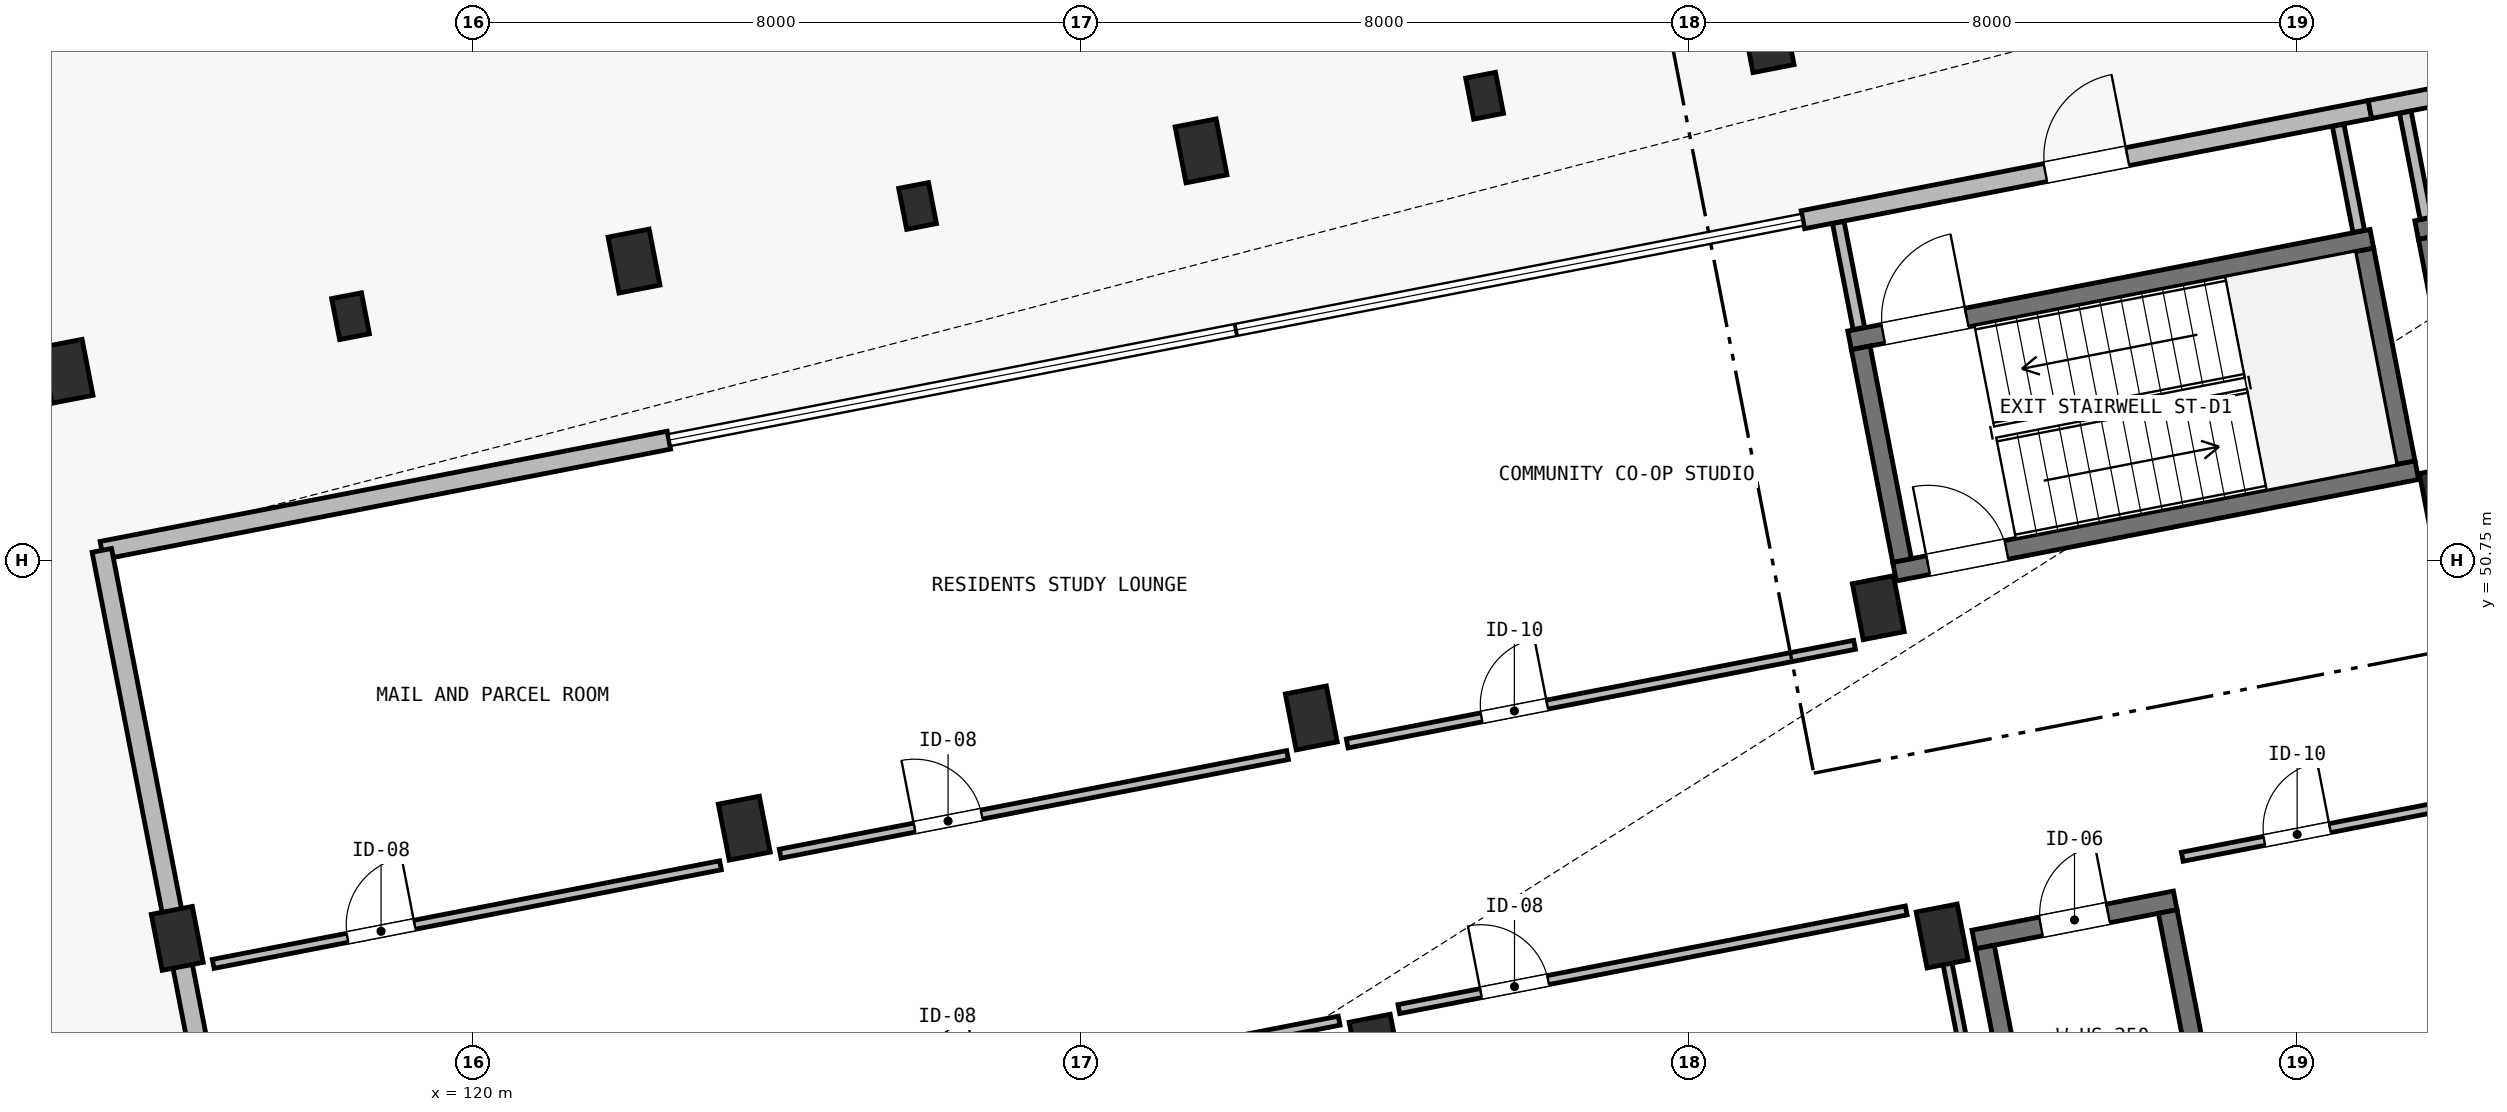
"""IFC4 building model, lengths in metres.
Left out: names, types, materials, properties, quantities, classifications, styles, units other than length and angle.
Written with IfcOpenShell. Run it as: python <this file> out.ifc"""

import sys

from ifc_helpers import new_model, si_unit, direction, frame, frame_2d, origin, origin_2d, place, context, subcontext, project, spatial, rectangle, extrude, element, fill, save


model = new_model("IFC4")
c1 = context("Model", 3, precision=1e-05, world=origin(), true_north=direction((0.0, 1.0)))
c2 = subcontext(c1, "Body", "Model", "MODEL_VIEW")
j1 = project(units=[si_unit("LENGTHUNIT", "METRE"), si_unit("PLANEANGLEUNIT", "RADIAN")], contexts=[c1])
p1 = place(None, origin())
s1 = spatial("IfcSite", under=j1, at=p1, CompositionType="ELEMENT")
p2 = place(p1, origin())
s2 = spatial("IfcBuilding", under=s1, at=p2, CompositionType="ELEMENT")
p3 = place(p2, origin())
s3 = spatial("IfcBuildingStorey", under=s2, at=p3, CompositionType="ELEMENT", Elevation=0.0)
for number, where, z_axis, x_axis in (
    (1, (116.11, 45.78, -0.35), (0.0, 0.0, 1.0), (0.982, 0.191, 0.0)),
    (2, (114.66, 53.24, -0.35), (0.0, 0.0, 1.0), (0.982, 0.191, 0.0)),
    (3, (123.571, 47.23, -0.35), (0.0, 0.0, 1.0), (0.982, 0.191, 0.0)),
    (4, (122.121, 54.69, -0.35), (0.0, 0.0, 1.0), (0.982, 0.191, 0.0)),
    (5, (131.871, 44.361, -0.35), (0.0, 0.0, 1.0), (0.982, 0.191, 0.0)),
    (6, (131.031, 48.68, -0.35), (0.0, 0.0, 1.0), (0.982, 0.191, 0.0)),
    (7, (129.581, 56.14, -0.35), (0.0, 0.0, 1.0), (0.982, 0.191, 0.0)),
    (8, (139.331, 45.811, -0.35), (0.0, 0.0, 1.0), (0.982, 0.191, 0.0)),
    (9, (138.491, 50.13, -0.35), (0.0, 0.0, 1.0), (0.982, 0.191, 0.0)),
    (10, (137.041, 57.59, -0.35), (0.0, 0.0, 1.0), (0.982, 0.191, 0.0)),
    (11, (145.952, 51.58, -0.35), (0.0, 0.0, 1.0), (0.982, 0.191, 0.0)),
):
    element("IfcColumn", number, at=place(p3, frame(where, z_axis=z_axis, x_axis=x_axis)), inside=s3, PredefinedType="COLUMN", context=c2, shape_type="SweptSolid", body=[
        extrude(rectangle(XDim=0.55, YDim=0.75, at=origin_2d()), origin(), (0.0, 0.0, 1.0), 4.85),
    ])
for number, where, z_axis, x_axis in (
    (12, (118.39, 53.965, -0.35), (0.0, 0.0, 1.0), (0.982, 0.191, 0.0)),
    (13, (125.851, 55.415, -0.35), (0.0, 0.0, 1.0), (0.982, 0.191, 0.0)),
    (14, (133.311, 56.865, -0.35), (0.0, 0.0, 1.0), (0.982, 0.191, 0.0)),
):
    element("IfcColumn", number, at=place(p3, frame(where, z_axis=z_axis, x_axis=x_axis)), inside=s3, PredefinedType="PILASTER", context=c2, shape_type="SweptSolid", body=[
        extrude(rectangle(XDim=0.4, YDim=0.55, at=origin_2d()), origin(), (0.0, 0.0, 1.0), 3.7),
    ])
p4 = place(p3, frame((138.113, 53.647, -0.35), z_axis=(0.0, 0.0, 1.0), x_axis=(0.981626097708, 0.19081458094, 0.0)))
e15 = element("IfcWall", 15, at=p4, inside=s3, PredefinedType="SHEAR", context=c2, shape_type="SweptSolid", body=[
    extrude(rectangle(XDim=7.0, YDim=0.25, at=frame_2d((3.5, 0.0))), origin(), (0.0, 0.0, 1.0), 4.85),
])
p5 = place(p4, frame((0.45, 0.0, 0.35)))
e16 = element("IfcOpeningElement", 16, at=p5, cuts=e15, PredefinedType="OPENING", context=c2, shape_type="SweptSolid", body=[
    extrude(rectangle(XDim=1.12, YDim=2.15, at=frame_2d((0.56, 1.075))), frame((0.0, 0.14, 0.0), z_axis=(0.0, -1.0, 0.0), x_axis=(1.0, 0.0, 0.0)), (0.0, 0.0, 1.0), 0.28),
])
p6 = place(p3, frame((138.705, 50.604, -0.35), z_axis=(0.0, 0.0, 1.0), x_axis=(0.981626097708, 0.19081458094, 0.0)))
e17 = element("IfcWall", 17, at=p6, inside=s3, PredefinedType="SHEAR", context=c2, shape_type="SweptSolid", body=[
    extrude(rectangle(XDim=7.0, YDim=0.25, at=frame_2d((3.5, 0.0))), origin(), (0.0, 0.0, 1.0), 4.85),
])
p7 = place(p6, frame((0.45, 0.0, 0.35)))
e18 = element("IfcOpeningElement", 18, at=p7, cuts=e17, PredefinedType="OPENING", context=c2, shape_type="SweptSolid", body=[
    extrude(rectangle(XDim=1.05, YDim=2.15, at=frame_2d((0.525, 1.075))), frame((0.0, 0.14, 0.0), z_axis=(0.0, -1.0, 0.0), x_axis=(1.0, 0.0, 0.0)), (0.0, 0.0, 1.0), 0.28),
])
p8 = place(p3, frame((138.804, 50.751, -0.35), z_axis=(0.0, 0.0, 1.0), x_axis=(-0.190858194834, 0.981617618762, 0.0)))
e19 = element("IfcWall", 19, at=p8, inside=s3, PredefinedType="SHEAR", context=c2, shape_type="SweptSolid", body=[
    extrude(rectangle(XDim=2.85, YDim=0.25, at=frame_2d((1.425, 0.0))), origin(), (0.0, 0.0, 1.0), 4.85),
])
p9 = place(p3, frame((145.43, 52.039, -0.35), z_axis=(0.0, 0.0, 1.0), x_axis=(-0.190842147128, 0.981620738819, 0.0)))
e20 = element("IfcWall", 20, at=p9, inside=s3, PredefinedType="SHEAR", context=c2, shape_type="SweptSolid", body=[
    extrude(rectangle(XDim=2.85, YDim=0.25, at=frame_2d((1.425, 0.0))), origin(), (0.0, 0.0, 1.0), 4.85),
])
p10 = place(p3, frame((145.574, 55.098, -0.35), z_axis=(0.0, 0.0, 1.0), x_axis=(0.981626097708, 0.19081458094, 0.0)))
e21 = element("IfcWall", 21, at=p10, inside=s3, PredefinedType="SHEAR", context=c2, shape_type="SweptSolid", body=[
    extrude(rectangle(XDim=7.0, YDim=0.25, at=frame_2d((3.5, 0.0))), origin(), (0.0, 0.0, 1.0), 4.85),
])
p11 = place(p10, frame((0.45, 0.0, 0.35)))
e22 = element("IfcOpeningElement", 22, at=p11, cuts=e21, PredefinedType="OPENING", context=c2, shape_type="SweptSolid", body=[
    extrude(rectangle(XDim=1.12, YDim=2.15, at=frame_2d((0.56, 1.075))), frame((0.0, 0.14, 0.0), z_axis=(0.0, -1.0, 0.0), x_axis=(1.0, 0.0, 0.0)), (0.0, 0.0, 1.0), 0.28),
])
p12 = place(p3, frame((146.264, 52.201, -0.35), z_axis=(0.0, 0.0, 1.0), x_axis=(-0.190775649797, 0.981633664584, 0.0)))
e23 = element("IfcWall", 23, at=p12, inside=s3, PredefinedType="SHEAR", context=c2, shape_type="SweptSolid", body=[
    extrude(rectangle(XDim=2.85, YDim=0.25, at=frame_2d((1.425, 0.0))), origin(), (0.0, 0.0, 1.0), 4.85),
])
p13 = place(p3, frame((139.748, 45.764, -0.35), z_axis=(0.0, 0.0, 1.0), x_axis=(0.981630445883, 0.190792210834, 0.0)))
e24 = element("IfcWall", 24, at=p13, inside=s3, PredefinedType="SHEAR", context=c2, shape_type="SweptSolid", body=[
    extrude(rectangle(XDim=2.7, YDim=0.25, at=frame_2d((1.35, 0.0))), origin(), (0.0, 0.0, 1.0), 4.85),
])
p14 = place(p13, frame((0.9, 0.0, 0.35)))
e25 = element("IfcOpeningElement", 25, at=p14, cuts=e24, PredefinedType="OPENING", context=c2, shape_type="SweptSolid", body=[
    extrude(rectangle(XDim=0.9, YDim=2.05, at=frame_2d((0.45, 1.025))), frame((0.0, 0.14, 0.0), z_axis=(0.0, -1.0, 0.0), x_axis=(1.0, 0.0, 0.0)), (0.0, 0.0, 1.0), 0.28),
])
for number, where, z_axis, x_axis in (
    (26, (140.218, 43.997, -0.35), (0.0, 0.0, 1.0), (-0.191, 0.982, 0.0)),
    (27, (142.623, 44.464, -0.35), (0.0, 0.0, 1.0), (-0.191, 0.982, 0.0)),
):
    element("IfcWall", number, at=place(p3, frame(where, z_axis=z_axis, x_axis=x_axis)), inside=s3, PredefinedType="SHEAR", context=c2, shape_type="SweptSolid", body=[
        extrude(rectangle(XDim=1.7, YDim=0.25, at=frame_2d((0.85, 0.0))), origin(), (0.0, 0.0, 1.0), 4.85),
    ])
p15 = place(p3, frame((115.118, 50.884, 0.0), z_axis=(0.0, 0.0, 1.0), x_axis=(0.981625252578, 0.19081892857, 0.0)))
e28 = element("IfcWall", 28, at=p15, inside=s3, PredefinedType="SOLIDWALL", context=c2, shape_type="SweptSolid", body=[
    extrude(rectangle(XDim=7.6, YDim=0.24, at=frame_2d((3.8, 0.0))), origin(), (0.0, 0.0, 1.0), 3.35),
])
p16 = place(p3, frame((137.499, 55.234, 0.0), z_axis=(0.0, 0.0, 1.0), x_axis=(0.981625252578, 0.19081892857, 0.0)))
e29 = element("IfcWall", 29, at=p16, inside=s3, PredefinedType="SOLIDWALL", context=c2, shape_type="SweptSolid", body=[
    extrude(rectangle(XDim=7.6, YDim=0.24, at=frame_2d((3.8, 0.0))), origin(), (0.0, 0.0, 1.0), 3.35),
])
p17 = place(p16, frame((3.25, 0.0, 0.0)))
e30 = element("IfcOpeningElement", 30, at=p17, cuts=e29, PredefinedType="OPENING", context=c2, shape_type="SweptSolid", body=[
    extrude(rectangle(XDim=1.1, YDim=2.15, at=frame_2d((0.55, 1.075))), frame((0.0, 0.135, 0.0), z_axis=(0.0, -1.0, 0.0), x_axis=(1.0, 0.0, 0.0)), (0.0, 0.0, 1.0), 0.27),
])
p18 = place(p3, frame((144.959, 56.685, 0.0), z_axis=(0.0, 0.0, 1.0), x_axis=(0.981626422232, 0.190812911449, 0.0)))
e31 = element("IfcWall", 31, at=p18, inside=s3, PredefinedType="SOLIDWALL", context=c2, shape_type="SweptSolid", body=[
    extrude(rectangle(XDim=7.6, YDim=0.24, at=frame_2d((3.8, 0.0))), origin(), (0.0, 0.0, 1.0), 3.35),
])
p19 = place(p18, frame((3.25, 0.0, 0.0)))
e32 = element("IfcOpeningElement", 32, at=p19, cuts=e31, PredefinedType="OPENING", context=c2, shape_type="SweptSolid", body=[
    extrude(rectangle(XDim=1.1, YDim=2.15, at=frame_2d((0.55, 1.075))), frame((0.0, 0.135, 0.0), z_axis=(0.0, -1.0, 0.0), x_axis=(1.0, 0.0, 0.0)), (0.0, 0.0, 1.0), 0.27),
])
p20 = place(p3, frame((117.942, 36.356, 0.0), z_axis=(0.0, 0.0, 1.0), x_axis=(-0.190809169338, 0.981627149633, 0.0)))
e33 = element("IfcWall", 33, at=p20, inside=s3, PredefinedType="SOLIDWALL", context=c2, shape_type="SweptSolid", body=[
    extrude(rectangle(XDim=14.8, YDim=0.26, at=frame_2d((7.4, 0.0))), origin(), (0.0, 0.0, 1.0), 3.35),
])
p21 = place(p3, frame((124.723, 43.399, 0.0), z_axis=(0.0, 0.0, 1.0), x_axis=(0.981630895566, 0.190789897189, 0.0)))
e34 = element("IfcWall", 34, at=p21, inside=s3, PredefinedType="PARTITIONING", context=c2, shape_type="SweptSolid", body=[
    extrude(rectangle(XDim=6.8, YDim=0.12, at=frame_2d((3.4, 0.0))), origin(), (0.0, 0.0, 1.0), 4.22),
])
p22 = place(p21, frame((1.1, 0.0, 0.0)))
e35 = element("IfcOpeningElement", 35, at=p22, cuts=e34, PredefinedType="OPENING", context=c2, shape_type="SweptSolid", body=[
    extrude(rectangle(XDim=0.9, YDim=2.1, at=frame_2d((0.45, 1.05))), frame((0.0, 0.075, 0.0), z_axis=(0.0, -1.0, 0.0), x_axis=(1.0, 0.0, 0.0)), (0.0, 0.0, 1.0), 0.15),
])
p23 = place(p3, frame((132.183, 44.849, 0.0), z_axis=(0.0, 0.0, 1.0), x_axis=(0.981630895566, 0.190789897189, 0.0)))
e36 = element("IfcWall", 36, at=p23, inside=s3, PredefinedType="PARTITIONING", context=c2, shape_type="SweptSolid", body=[
    extrude(rectangle(XDim=6.8, YDim=0.12, at=frame_2d((3.4, 0.0))), origin(), (0.0, 0.0, 1.0), 4.22),
])
p24 = place(p23, frame((1.1, 0.0, 0.0)))
e37 = element("IfcOpeningElement", 37, at=p24, cuts=e36, PredefinedType="OPENING", context=c2, shape_type="SweptSolid", body=[
    extrude(rectangle(XDim=0.9, YDim=2.1, at=frame_2d((0.45, 1.05))), frame((0.0, 0.075, 0.0), z_axis=(0.0, -1.0, 0.0), x_axis=(1.0, 0.0, 0.0)), (0.0, 0.0, 1.0), 0.15),
])
p25 = place(p3, frame((142.49, 46.853, 0.0), z_axis=(0.0, 0.0, 1.0), x_axis=(0.981628093632, 0.190804312824, 0.0)))
e38 = element("IfcWall", 38, at=p25, inside=s3, PredefinedType="PARTITIONING", context=c2, shape_type="SweptSolid", body=[
    extrude(rectangle(XDim=3.9, YDim=0.12, at=frame_2d((1.95, 0.0))), origin(), (0.0, 0.0, 1.0), 4.22),
])
p26 = place(p25, frame((1.1, 0.0, 0.0)))
e39 = element("IfcOpeningElement", 39, at=p26, cuts=e38, PredefinedType="OPENING", context=c2, shape_type="SweptSolid", body=[
    extrude(rectangle(XDim=0.88, YDim=2.1, at=frame_2d((0.44, 1.05))), frame((0.0, 0.075, 0.0), z_axis=(0.0, -1.0, 0.0), x_axis=(1.0, 0.0, 0.0)), (0.0, 0.0, 1.0), 0.15),
])
p27 = place(p3, frame((140.298, 40.834, 0.0), z_axis=(0.0, 0.0, 1.0), x_axis=(-0.190833814627, 0.981622358748, 0.0)))
e40 = element("IfcWall", 40, at=p27, inside=s3, PredefinedType="PARTITIONING", context=c2, shape_type="SweptSolid", body=[
    extrude(rectangle(XDim=4.74, YDim=0.12, at=frame_2d((2.37, 0.0))), origin(), (0.0, 0.0, 1.0), 3.32),
])
p28 = place(p3, frame((116.583, 45.444, 0.0), z_axis=(0.0, 0.0, 1.0), x_axis=(0.981630895566, 0.190789897189, 0.0)))
e41 = element("IfcWall", 41, at=p28, inside=s3, PredefinedType="PARTITIONING", context=c2, shape_type="SweptSolid", body=[
    extrude(rectangle(XDim=6.8, YDim=0.12, at=frame_2d((3.4, 0.0))), origin(), (0.0, 0.0, 1.0), 4.22),
])
p29 = place(p28, frame((1.8, 0.0, 0.0)))
e42 = element("IfcOpeningElement", 42, at=p29, cuts=e41, PredefinedType="OPENING", context=c2, shape_type="SweptSolid", body=[
    extrude(rectangle(XDim=0.9, YDim=2.1, at=frame_2d((0.45, 1.05))), frame((0.0, 0.075, 0.0), z_axis=(0.0, -1.0, 0.0), x_axis=(1.0, 0.0, 0.0)), (0.0, 0.0, 1.0), 0.15),
])
p30 = place(p3, frame((124.043, 46.894, 0.0), z_axis=(0.0, 0.0, 1.0), x_axis=(0.981630895566, 0.190789897189, 0.0)))
e43 = element("IfcWall", 43, at=p30, inside=s3, PredefinedType="PARTITIONING", context=c2, shape_type="SweptSolid", body=[
    extrude(rectangle(XDim=6.8, YDim=0.12, at=frame_2d((3.4, 0.0))), origin(), (0.0, 0.0, 1.0), 4.22),
])
p31 = place(p30, frame((1.8, 0.0, 0.0)))
e44 = element("IfcOpeningElement", 44, at=p31, cuts=e43, PredefinedType="OPENING", context=c2, shape_type="SweptSolid", body=[
    extrude(rectangle(XDim=0.9, YDim=2.1, at=frame_2d((0.45, 1.05))), frame((0.0, 0.075, 0.0), z_axis=(0.0, -1.0, 0.0), x_axis=(1.0, 0.0, 0.0)), (0.0, 0.0, 1.0), 0.15),
])
p32 = place(p3, frame((131.504, 48.344, 0.0), z_axis=(0.0, 0.0, 1.0), x_axis=(0.981624170853, 0.190824493182, 0.0)))
e45 = element("IfcWall", 45, at=p32, inside=s3, PredefinedType="PARTITIONING", context=c2, shape_type="SweptSolid", body=[
    extrude(rectangle(XDim=6.8, YDim=0.12, at=frame_2d((3.4, 0.0))), origin(), (0.0, 0.0, 1.0), 4.22),
])
p33 = place(p32, frame((1.8, 0.0, 0.0)))
e46 = element("IfcOpeningElement", 46, at=p33, cuts=e45, PredefinedType="OPENING", context=c2, shape_type="SweptSolid", body=[
    extrude(rectangle(XDim=0.88, YDim=2.1, at=frame_2d((0.44, 1.05))), frame((0.0, 0.075, 0.0), z_axis=(0.0, -1.0, 0.0), x_axis=(1.0, 0.0, 0.0)), (0.0, 0.0, 1.0), 0.15),
])
p34 = place(p3, frame((138.236, 53.804, 0.0), z_axis=(0.0, 0.0, 1.0), x_axis=(-0.190690165368, 0.981650274197, 0.0)))
e47 = element("IfcWall", 47, at=p34, inside=s3, PredefinedType="PARTITIONING", context=c2, shape_type="SweptSolid", body=[
    extrude(rectangle(XDim=1.42, YDim=0.155, at=frame_2d((0.71, 0.0))), origin(), (0.0, 0.0, 1.0), 3.35),
])
p35 = place(p3, frame((144.812, 55.082, 0.0), z_axis=(0.0, 0.0, 1.0), x_axis=(-0.190657983598, 0.98165652511, 0.0)))
e48 = element("IfcWall", 48, at=p35, inside=s3, PredefinedType="PARTITIONING", context=c2, shape_type="SweptSolid", body=[
    extrude(rectangle(XDim=1.42, YDim=0.155, at=frame_2d((0.71, 0.0))), origin(), (0.0, 0.0, 1.0), 3.35),
])
p36 = place(p3, frame((145.696, 55.254, 0.0), z_axis=(0.0, 0.0, 1.0), x_axis=(-0.190855852571, 0.981618074171, 0.0)))
e49 = element("IfcWall", 49, at=p36, inside=s3, PredefinedType="PARTITIONING", context=c2, shape_type="SweptSolid", body=[
    extrude(rectangle(XDim=1.42, YDim=0.155, at=frame_2d((0.71, 0.0))), origin(), (0.0, 0.0, 1.0), 3.35),
])
p37 = place(p17, origin())
e50 = element("IfcDoor", 50, at=p37, inside=s3, OperationType="SINGLE_SWING_RIGHT", PredefinedType="DOOR", context=c2, shape_type="SweptSolid", body=[
    extrude(rectangle(XDim=1.1, YDim=2.15, at=frame_2d((0.55, 1.075))), frame((0.0, 0.025, 0.0), z_axis=(0.0, -1.0, 0.0), x_axis=(1.0, 0.0, 0.0)), (0.0, 0.0, 1.0), 0.05),
])
fill(e30, e50)
p38 = place(p24, origin())
e51 = element("IfcDoor", 51, at=p38, inside=s3, OperationType="SINGLE_SWING_LEFT", PredefinedType="DOOR", context=c2, shape_type="SweptSolid", body=[
    extrude(rectangle(XDim=0.9, YDim=2.1, at=frame_2d((0.45, 1.05))), frame((0.0, 0.025, 0.0), z_axis=(0.0, -1.0, 0.0), x_axis=(1.0, 0.0, 0.0)), (0.0, 0.0, 1.0), 0.05),
])
fill(e37, e51)
p39 = place(p26, origin())
e52 = element("IfcDoor", 52, at=p39, inside=s3, OperationType="SINGLE_SWING_RIGHT", PredefinedType="DOOR", context=c2, shape_type="SweptSolid", body=[
    extrude(rectangle(XDim=0.88, YDim=2.1, at=frame_2d((0.44, 1.05))), frame((0.0, 0.025, 0.0), z_axis=(0.0, -1.0, 0.0), x_axis=(1.0, 0.0, 0.0)), (0.0, 0.0, 1.0), 0.05),
])
fill(e39, e52)
p40 = place(p29, origin())
e53 = element("IfcDoor", 53, at=p40, inside=s3, OperationType="SINGLE_SWING_RIGHT", PredefinedType="DOOR", context=c2, shape_type="SweptSolid", body=[
    extrude(rectangle(XDim=0.9, YDim=2.1, at=frame_2d((0.45, 1.05))), frame((0.0, 0.025, 0.0), z_axis=(0.0, -1.0, 0.0), x_axis=(1.0, 0.0, 0.0)), (0.0, 0.0, 1.0), 0.05),
])
fill(e42, e53)
p41 = place(p31, origin())
e54 = element("IfcDoor", 54, at=p41, inside=s3, OperationType="SINGLE_SWING_LEFT", PredefinedType="DOOR", context=c2, shape_type="SweptSolid", body=[
    extrude(rectangle(XDim=0.9, YDim=2.1, at=frame_2d((0.45, 1.05))), frame((0.0, 0.025, 0.0), z_axis=(0.0, -1.0, 0.0), x_axis=(1.0, 0.0, 0.0)), (0.0, 0.0, 1.0), 0.05),
])
fill(e44, e54)
p42 = place(p33, origin())
e55 = element("IfcDoor", 55, at=p42, inside=s3, OperationType="SINGLE_SWING_RIGHT", PredefinedType="DOOR", context=c2, shape_type="SweptSolid", body=[
    extrude(rectangle(XDim=0.88, YDim=2.1, at=frame_2d((0.44, 1.05))), frame((0.0, 0.025, 0.0), z_axis=(0.0, -1.0, 0.0), x_axis=(1.0, 0.0, 0.0)), (0.0, 0.0, 1.0), 0.05),
])
fill(e46, e55)
p43 = place(p7, origin())
e56 = element("IfcDoor", 56, at=p43, inside=s3, OperationType="SINGLE_SWING_LEFT", PredefinedType="DOOR", context=c2, shape_type="SweptSolid", body=[
    extrude(rectangle(XDim=1.05, YDim=2.15, at=frame_2d((0.525, 1.075))), frame((0.0, 0.025, 0.0), z_axis=(0.0, -1.0, 0.0), x_axis=(1.0, 0.0, 0.0)), (0.0, 0.0, 1.0), 0.05),
])
fill(e18, e56)
p44 = place(p5, origin())
e57 = element("IfcDoor", 57, at=p44, inside=s3, OperationType="SINGLE_SWING_RIGHT", PredefinedType="DOOR", context=c2, shape_type="SweptSolid", body=[
    extrude(rectangle(XDim=1.12, YDim=2.15, at=frame_2d((0.56, 1.075))), frame((0.0, 0.025, 0.0), z_axis=(0.0, -1.0, 0.0), x_axis=(1.0, 0.0, 0.0)), (0.0, 0.0, 1.0), 0.05),
])
fill(e16, e57)
p45 = place(p14, origin())
e58 = element("IfcDoor", 58, at=p45, inside=s3, OperationType="SINGLE_SWING_RIGHT", PredefinedType="DOOR", context=c2, shape_type="SweptSolid", body=[
    extrude(rectangle(XDim=0.9, YDim=2.05, at=frame_2d((0.45, 1.025))), frame((0.0, 0.025, 0.0), z_axis=(0.0, -1.0, 0.0), x_axis=(1.0, 0.0, 0.0)), (0.0, 0.0, 1.0), 0.05),
])
fill(e25, e58)
save(model, sys.argv[1])
